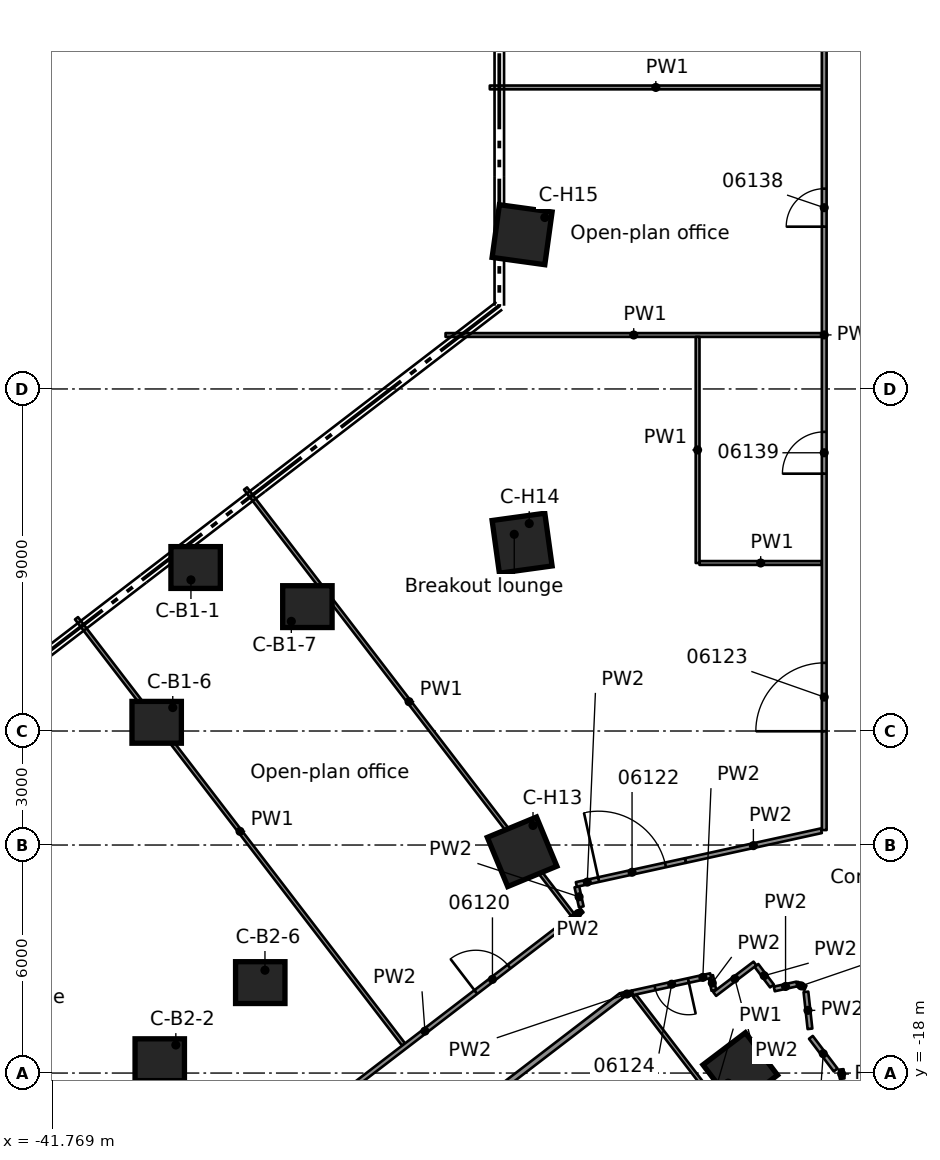
"""IFC4 building model, lengths in metres.
Left out: names, types, materials, properties, quantities, classifications, styles, units other than length and angle.
Written with IfcOpenShell. Run it as: python <this file> out.ifc"""

import sys

from ifc_helpers import new_model, si_unit, direction, frame, frame_2d, origin, origin_2d, place, context, subcontext, project, spatial, rectangle, extrude, element, fill, save


model = new_model("IFC4")
c1 = context("Model", 3, precision=1e-05, world=origin(), true_north=direction((0.0, 1.0)))
c2 = subcontext(c1, "Body", "Model", "MODEL_VIEW")
j1 = project(units=[si_unit("LENGTHUNIT", "METRE"), si_unit("PLANEANGLEUNIT", "RADIAN")], contexts=[c1])
p1 = place(None, origin())
s1 = spatial("IfcSite", under=j1, at=p1, CompositionType="ELEMENT")
p2 = place(p1, origin())
s2 = spatial("IfcBuilding", under=s1, at=p2, CompositionType="ELEMENT")
p3 = place(p2, frame((0.0, 0.0, 29.2)))
s3 = spatial("IfcBuildingStorey", under=s2, at=p3, CompositionType="ELEMENT", Elevation=29.2)
for number, where, z_axis, x_axis in (
    (1, (-37.991, -4.698, 0.0), (0.0, 0.0, 1.0), (1.0, 0.0, 0.0)),
    (2, (-39.016, -8.771, 0.0), (0.0, 0.0, 1.0), (1.0, 0.0, 0.0)),
    (3, (-35.05, -5.727, 0.0), (0.0, 0.0, 1.0), (1.0, 0.0, 0.0)),
    (4, (-38.935, -17.649, 0.0), (0.0, 0.0, 1.0), (1.0, 0.0, 0.0)),
    (5, (-36.29, -15.62, 0.0), (0.0, 0.0, 1.0), (1.0, 0.0, 0.0)),
):
    element("IfcColumn", number, at=place(p3, frame(where, z_axis=z_axis, x_axis=x_axis)), inside=s3, PredefinedType="COLUMN", context=c2, shape_type="SweptSolid", body=[
        extrude(rectangle(XDim=1.3, YDim=1.1, at=origin_2d()), origin(), (0.0, 0.0, 1.0), 4.1),
    ])
for number, where, z_axis, x_axis in (
    (6, (-23.659, -17.919, 0.0), (0.0, 0.0, 1.0), (-0.797, -0.604, 0.0)),
    (7, (-29.4, -12.178, 0.0), (0.0, 0.0, 1.0), (-0.924, -0.383, 0.0)),
    (8, (-29.4, -4.059, 0.0), (0.0, 0.0, 1.0), (-0.991, -0.137, 0.0)),
    (9, (-29.4, 4.059, 0.0), (0.0, 0.0, 1.0), (-0.991, 0.137, 0.0)),
):
    element("IfcColumn", number, at=place(p3, frame(where, z_axis=z_axis, x_axis=x_axis)), inside=s3, PredefinedType="COLUMN", context=c2, shape_type="SweptSolid", body=[
        extrude(rectangle(XDim=1.4, YDim=1.4, at=origin_2d()), origin(), (0.0, 0.0, 1.0), 4.1),
    ])
p4 = place(p3, frame((-21.004, -17.904, 0.0), z_axis=(0.0, 0.0, 1.0), x_axis=(0.105933230141, -0.994373245191, 0.0)))
e10 = element("IfcWall", 10, at=p4, inside=s3, PredefinedType="PARTITIONING", context=c2, shape_type="SweptSolid", body=[
    extrude(rectangle(XDim=0.244, YDim=0.125, at=frame_2d((0.122, 0.0))), origin(), (0.0, 0.0, 1.0), 3.66),
])
p5 = place(p3, frame((-21.931, -15.864, 0.0), z_axis=(0.0, 0.0, 1.0), x_axis=(0.10837572028, -0.99411000561, 0.0)))
e11 = element("IfcWall", 11, at=p5, inside=s3, PredefinedType="PARTITIONING", context=c2, shape_type="SweptSolid", body=[
    extrude(rectangle(XDim=0.978, YDim=0.125, at=frame_2d((0.489, 0.0))), origin(), (0.0, 0.0, 1.0), 3.66),
])
p6 = place(p3, frame((-24.438, -15.437, 0.0), z_axis=(0.0, 0.0, 1.0), x_axis=(0.212096867325, -0.977248647413, 0.0)))
e12 = element("IfcWall", 12, at=p6, inside=s3, PredefinedType="PARTITIONING", context=c2, shape_type="SweptSolid", body=[
    extrude(rectangle(XDim=0.396, YDim=0.125, at=frame_2d((0.198, 0.0))), origin(), (0.0, 0.0, 1.0), 3.66),
])
p7 = place(p3, frame((-27.959, -13.1, 0.0), z_axis=(0.0, 0.0, 1.0), x_axis=(0.215346078447, -0.976537795734, 0.0)))
e13 = element("IfcWall", 13, at=p7, inside=s3, PredefinedType="PARTITIONING", context=c2, shape_type="SweptSolid", body=[
    extrude(rectangle(XDim=0.539, YDim=0.125, at=frame_2d((0.269, 0.0))), origin(), (0.0, 0.0, 1.0), 3.66),
])
p8 = place(p3, frame((-23.234, -15.168, 0.0), z_axis=(0.0, 0.0, 1.0), x_axis=(0.602990949897, -0.797748026849, 0.0)))
e14 = element("IfcWall", 14, at=p8, inside=s3, PredefinedType="PARTITIONING", context=c2, shape_type="SweptSolid", body=[
    extrude(rectangle(XDim=0.678, YDim=0.125, at=frame_2d((0.339, 0.0))), origin(), (0.0, 0.0, 1.0), 3.66),
])
p9 = place(p3, frame((-21.801, -17.061, 0.0), z_axis=(0.0, 0.0, 1.0), x_axis=(0.604123687543, -0.796890563471, 0.0)))
e15 = element("IfcWall", 15, at=p9, inside=s3, PredefinedType="PARTITIONING", context=c2, shape_type="SweptSolid", body=[
    extrude(rectangle(XDim=1.078, YDim=0.125, at=frame_2d((0.539, 0.0))), origin(), (0.0, 0.0, 1.0), 3.66),
])
p10 = place(p3, frame((-41.126, -6.033, 0.0), z_axis=(0.0, 0.0, 1.0), x_axis=(0.608775561638, -0.793342495743, 0.0)))
e16 = element("IfcWall", 16, at=p10, inside=s3, PredefinedType="PARTITIONING", context=c2, shape_type="SweptSolid", body=[
    extrude(rectangle(XDim=14.136, YDim=0.1, at=frame_2d((7.068, 0.0))), origin(), (0.0, 0.0, 1.0), 3.66),
])
p11 = place(p3, frame((-36.678, -2.62, 0.0), z_axis=(0.0, 0.0, 1.0), x_axis=(0.608783902678, -0.793336095132, 0.0)))
e17 = element("IfcWall", 17, at=p11, inside=s3, PredefinedType="PARTITIONING", context=c2, shape_type="SweptSolid", body=[
    extrude(rectangle(XDim=14.136, YDim=0.1, at=frame_2d((7.068, 0.0))), origin(), (0.0, 0.0, 1.0), 3.66),
])
p12 = place(p3, frame((-26.44, -15.962, 0.0), z_axis=(0.0, 0.0, 1.0), x_axis=(0.608697215762, -0.79340260872, 0.0)))
e18 = element("IfcWall", 18, at=p12, inside=s3, PredefinedType="PARTITIONING", context=c2, shape_type="SweptSolid", body=[
    extrude(rectangle(XDim=6.79, YDim=0.1, at=frame_2d((3.395, 0.0))), origin(), (0.0, 0.0, 1.0), 3.66),
])
p13 = place(p3, frame((-22.17, -15.656, 0.0), z_axis=(0.0, 0.0, 1.0), x_axis=(0.914864311429, -0.403761429156, 0.0)))
e19 = element("IfcWall", 19, at=p13, inside=s3, PredefinedType="PARTITIONING", context=c2, shape_type="SweptSolid", body=[
    extrude(rectangle(XDim=0.248, YDim=0.125, at=frame_2d((0.124, 0.0))), origin(), (0.0, 0.0, 1.0), 3.66),
])
p14 = place(p3, frame((-24.732, -4.579, 0.0), z_axis=(0.0, 0.0, 1.0), x_axis=(1.0, 0.0, 0.0)))
e20 = element("IfcWall", 20, at=p14, inside=s3, PredefinedType="PARTITIONING", context=c2, shape_type="SweptSolid", body=[
    extrude(rectangle(XDim=3.22, YDim=0.1, at=frame_2d((1.61, 0.0))), origin(), (0.0, 0.0, 1.0), 3.66),
])
p15 = place(p3, frame((-31.414, 1.42, 0.0), z_axis=(0.0, 0.0, 1.0), x_axis=(1.0, 0.0, 0.0)))
e21 = element("IfcWall", 21, at=p15, inside=s3, PredefinedType="PARTITIONING", context=c2, shape_type="SweptSolid", body=[
    extrude(rectangle(XDim=9.902, YDim=0.1, at=frame_2d((4.951, 0.0))), origin(), (0.0, 0.0, 1.0), 3.66),
])
p16 = place(p3, frame((-30.25, 7.934, 0.0), z_axis=(0.0, 0.0, 1.0), x_axis=(1.0, 0.0, 0.0)))
e22 = element("IfcWall", 22, at=p16, inside=s3, PredefinedType="PARTITIONING", context=c2, shape_type="SweptSolid", body=[
    extrude(rectangle(XDim=8.738, YDim=0.1, at=frame_2d((4.369, 0.0))), origin(), (0.0, 0.0, 1.0), 3.66),
])
p17 = place(p3, frame((-26.785, -15.952, 0.0), z_axis=(0.0, 0.0, 1.0), x_axis=(0.977034522057, 0.213081070744, 0.0)))
e23 = element("IfcWall", 23, at=p17, inside=s3, PredefinedType="PARTITIONING", context=c2, shape_type="SweptSolid", body=[
    extrude(rectangle(XDim=0.296, YDim=0.125, at=frame_2d((0.148, 0.0))), origin(), (0.0, 0.0, 1.0), 3.66),
])
p18 = place(p3, frame((-22.765, -15.787, 0.0), z_axis=(0.0, 0.0, 1.0), x_axis=(0.97657209397, 0.215190486033, 0.0)))
e24 = element("IfcWall", 24, at=p18, inside=s3, PredefinedType="PARTITIONING", context=c2, shape_type="SweptSolid", body=[
    extrude(rectangle(XDim=0.609, YDim=0.125, at=frame_2d((0.305, 0.0))), origin(), (0.0, 0.0, 1.0), 3.66),
])
p19 = place(p3, frame((-24.438, -15.437, 0.0), z_axis=(0.0, 0.0, 1.0), x_axis=(-0.976731913461, -0.214463911247, 0.0)))
e25 = element("IfcWall", 25, at=p19, inside=s3, PredefinedType="PARTITIONING", context=c2, shape_type="SweptSolid", body=[
    extrude(rectangle(XDim=2.107, YDim=0.125, at=frame_2d((1.054, 0.0))), origin(), (0.0, 0.0, 1.0), 3.66),
])
p20 = place(p19, frame((0.6, 0.0, 0.0)))
e26 = element("IfcOpeningElement", 26, at=p20, cuts=e25, PredefinedType="OPENING", context=c2, shape_type="SweptSolid", body=[
    extrude(rectangle(XDim=0.9, YDim=2.1, at=frame_2d((0.45, 1.05))), frame((0.0, 0.073, 0.0), z_axis=(0.0, -1.0, 0.0), x_axis=(1.0, 0.0, 0.0)), (0.0, 0.0, 1.0), 0.145),
])
p21 = place(p3, frame((-25.102, -12.408, 0.0), z_axis=(0.0, 0.0, 1.0), x_axis=(0.976805954505, 0.214126428176, 0.0)))
e27 = element("IfcWall", 27, at=p21, inside=s3, PredefinedType="PARTITIONING", context=c2, shape_type="SweptSolid", body=[
    extrude(rectangle(XDim=3.661, YDim=0.125, at=frame_2d((1.831, 0.0))), origin(), (0.0, 0.0, 1.0), 3.66),
])
p22 = place(p3, frame((-27.972, -13.038, 0.0), z_axis=(0.0, 0.0, 1.0), x_axis=(0.976718013582, 0.214527205604, 0.0)))
e28 = element("IfcWall", 28, at=p22, inside=s3, PredefinedType="PARTITIONING", context=c2, shape_type="SweptSolid", body=[
    extrude(rectangle(XDim=2.937, YDim=0.125, at=frame_2d((1.469, 0.0))), origin(), (0.0, 0.0, 1.0), 3.66),
])
p23 = place(p22, frame((0.6, 0.0, 0.0)))
e29 = element("IfcOpeningElement", 29, at=p23, cuts=e28, PredefinedType="OPENING", context=c2, shape_type="SweptSolid", body=[
    extrude(rectangle(XDim=1.8, YDim=2.1, at=frame_2d((0.9, 1.05))), frame((0.0, 0.073, 0.0), z_axis=(0.0, -1.0, 0.0), x_axis=(1.0, 0.0, 0.0)), (0.0, 0.0, 1.0), 0.145),
])
p24 = place(p3, frame((-24.332, -15.92, 0.0), z_axis=(0.0, 0.0, 1.0), x_axis=(0.797480426333, 0.603344818172, 0.0)))
e30 = element("IfcWall", 30, at=p24, inside=s3, PredefinedType="PARTITIONING", context=c2, shape_type="SweptSolid", body=[
    extrude(rectangle(XDim=1.329, YDim=0.125, at=frame_2d((0.665, 0.0))), origin(), (0.0, 0.0, 1.0), 3.66),
])
p25 = place(p3, frame((-44.11, -29.247, 0.0), z_axis=(0.0, 0.0, 1.0), x_axis=(0.793471030698, 0.608608021179, 0.0)))
e31 = element("IfcWall", 31, at=p25, inside=s3, PredefinedType="PARTITIONING", context=c2, shape_type="SweptSolid", body=[
    extrude(rectangle(XDim=21.838, YDim=0.15, at=frame_2d((10.919, 0.0))), origin(), (0.0, 0.0, 1.0), 3.66),
])
p26 = place(p3, frame((-35.881, -19.906, 0.0), z_axis=(0.0, 0.0, 1.0), x_axis=(0.793491146474, 0.608581794394, 0.0)))
e32 = element("IfcWall", 32, at=p26, inside=s3, PredefinedType="PARTITIONING", context=c2, shape_type="SweptSolid", body=[
    extrude(rectangle(XDim=9.892, YDim=0.125, at=frame_2d((4.946, 0.0))), origin(), (0.0, 0.0, 1.0), 3.66),
])
p27 = place(p26, frame((6.634, 0.0, 0.0)))
e33 = element("IfcOpeningElement", 33, at=p27, cuts=e32, PredefinedType="OPENING", context=c2, shape_type="SweptSolid", body=[
    extrude(rectangle(XDim=1.1, YDim=2.1, at=frame_2d((0.55, 1.05))), frame((0.0, 0.073, 0.0), z_axis=(0.0, -1.0, 0.0), x_axis=(1.0, 0.0, 0.0)), (0.0, 0.0, 1.0), 0.145),
])
p28 = place(p3, frame((-28.034, -13.885, 0.0), z_axis=(0.0, 0.0, 1.0), x_axis=(0.792488206653, 0.609887237378, 0.0)))
e34 = element("IfcWall", 34, at=p28, inside=s3, PredefinedType="PARTITIONING", context=c2, shape_type="SweptSolid", body=[
    extrude(rectangle(XDim=0.267, YDim=0.125, at=frame_2d((0.134, 0.0))), origin(), (0.0, 0.0, 1.0), 3.66),
])
p29 = place(p3, frame((-21.45, -11.607, 0.0), z_axis=(0.0, 0.0, 1.0), x_axis=(0.0, 1.0, 0.0)))
e35 = element("IfcWall", 35, at=p29, inside=s3, PredefinedType="PARTITIONING", context=c2, shape_type="SweptSolid", body=[
    extrude(rectangle(XDim=26.058, YDim=0.125, at=frame_2d((13.029, 0.0))), origin(), (0.0, 0.0, 1.0), 3.66),
])
p30 = place(p29, frame((2.6, 0.0, 0.0)))
e36 = element("IfcOpeningElement", 36, at=p30, cuts=e35, PredefinedType="OPENING", context=c2, shape_type="SweptSolid", body=[
    extrude(rectangle(XDim=1.8, YDim=2.1, at=frame_2d((0.9, 1.05))), frame((0.0, 0.073, 0.0), z_axis=(0.0, -1.0, 0.0), x_axis=(1.0, 0.0, 0.0)), (0.0, 0.0, 1.0), 0.145),
])
p31 = place(p29, frame((15.877, 0.0, 0.0)))
e37 = element("IfcOpeningElement", 37, at=p31, cuts=e35, PredefinedType="OPENING", context=c2, shape_type="SweptSolid", body=[
    extrude(rectangle(XDim=1.0, YDim=2.1, at=frame_2d((0.5, 1.05))), frame((0.0, 0.073, 0.0), z_axis=(0.0, -1.0, 0.0), x_axis=(1.0, 0.0, 0.0)), (0.0, 0.0, 1.0), 0.145),
])
p32 = place(p29, frame((9.378, 0.0, 0.0)))
e38 = element("IfcOpeningElement", 38, at=p32, cuts=e35, PredefinedType="OPENING", context=c2, shape_type="SweptSolid", body=[
    extrude(rectangle(XDim=1.1, YDim=2.1, at=frame_2d((0.55, 1.05))), frame((0.0, 0.073, 0.0), z_axis=(0.0, -1.0, 0.0), x_axis=(1.0, 0.0, 0.0)), (0.0, 0.0, 1.0), 0.145),
])
p33 = place(p3, frame((-24.782, -4.579, 0.0), z_axis=(0.0, 0.0, 1.0), x_axis=(0.0, 1.0, 0.0)))
e39 = element("IfcWall", 39, at=p33, inside=s3, PredefinedType="PARTITIONING", context=c2, shape_type="SweptSolid", body=[
    extrude(rectangle(XDim=5.949, YDim=0.1, at=frame_2d((2.975, 0.0))), origin(), (0.0, 0.0, 1.0), 3.66),
])
p34 = place(p27, origin())
e40 = element("IfcDoor", 40, at=p34, inside=s3, OperationType="SINGLE_SWING_RIGHT", PredefinedType="DOOR", context=c2, shape_type="SweptSolid", body=[
    extrude(rectangle(XDim=1.1, YDim=2.1, at=frame_2d((0.55, 1.05))), frame((0.0, 0.025, 0.0), z_axis=(0.0, -1.0, 0.0), x_axis=(1.0, 0.0, 0.0)), (0.0, 0.0, 1.0), 0.05),
])
fill(e33, e40)
p35 = place(p23, origin())
e41 = element("IfcDoor", 41, at=p35, inside=s3, OperationType="DOUBLE_DOOR_SINGLE_SWING", PredefinedType="DOOR", context=c2, shape_type="SweptSolid", body=[
    extrude(rectangle(XDim=1.8, YDim=2.1, at=frame_2d((0.9, 1.05))), frame((0.0, 0.025, 0.0), z_axis=(0.0, -1.0, 0.0), x_axis=(1.0, 0.0, 0.0)), (0.0, 0.0, 1.0), 0.05),
])
fill(e29, e41)
p36 = place(p30, origin())
e42 = element("IfcDoor", 42, at=p36, inside=s3, OperationType="DOUBLE_DOOR_SINGLE_SWING", PredefinedType="DOOR", context=c2, shape_type="SweptSolid", body=[
    extrude(rectangle(XDim=1.8, YDim=2.1, at=frame_2d((0.9, 1.05))), frame((0.0, 0.025, 0.0), z_axis=(0.0, -1.0, 0.0), x_axis=(1.0, 0.0, 0.0)), (0.0, 0.0, 1.0), 0.05),
])
fill(e36, e42)
p37 = place(p20, origin())
e43 = element("IfcDoor", 43, at=p37, inside=s3, OperationType="SINGLE_SWING_LEFT", PredefinedType="DOOR", context=c2, shape_type="SweptSolid", body=[
    extrude(rectangle(XDim=0.9, YDim=2.1, at=frame_2d((0.45, 1.05))), frame((0.0, 0.025, 0.0), z_axis=(0.0, -1.0, 0.0), x_axis=(1.0, 0.0, 0.0)), (0.0, 0.0, 1.0), 0.05),
])
fill(e26, e43)
p38 = place(p31, origin())
e44 = element("IfcDoor", 44, at=p38, inside=s3, OperationType="SINGLE_SWING_RIGHT", PredefinedType="DOOR", context=c2, shape_type="SweptSolid", body=[
    extrude(rectangle(XDim=1.0, YDim=2.1, at=frame_2d((0.5, 1.05))), frame((0.0, 0.025, 0.0), z_axis=(0.0, -1.0, 0.0), x_axis=(1.0, 0.0, 0.0)), (0.0, 0.0, 1.0), 0.05),
])
fill(e37, e44)
p39 = place(p32, origin())
e45 = element("IfcDoor", 45, at=p39, inside=s3, OperationType="SINGLE_SWING_LEFT", PredefinedType="DOOR", context=c2, shape_type="SweptSolid", body=[
    extrude(rectangle(XDim=1.1, YDim=2.1, at=frame_2d((0.55, 1.05))), frame((0.0, 0.025, 0.0), z_axis=(0.0, -1.0, 0.0), x_axis=(1.0, 0.0, 0.0)), (0.0, 0.0, 1.0), 0.05),
])
fill(e38, e45)
save(model, sys.argv[1])
